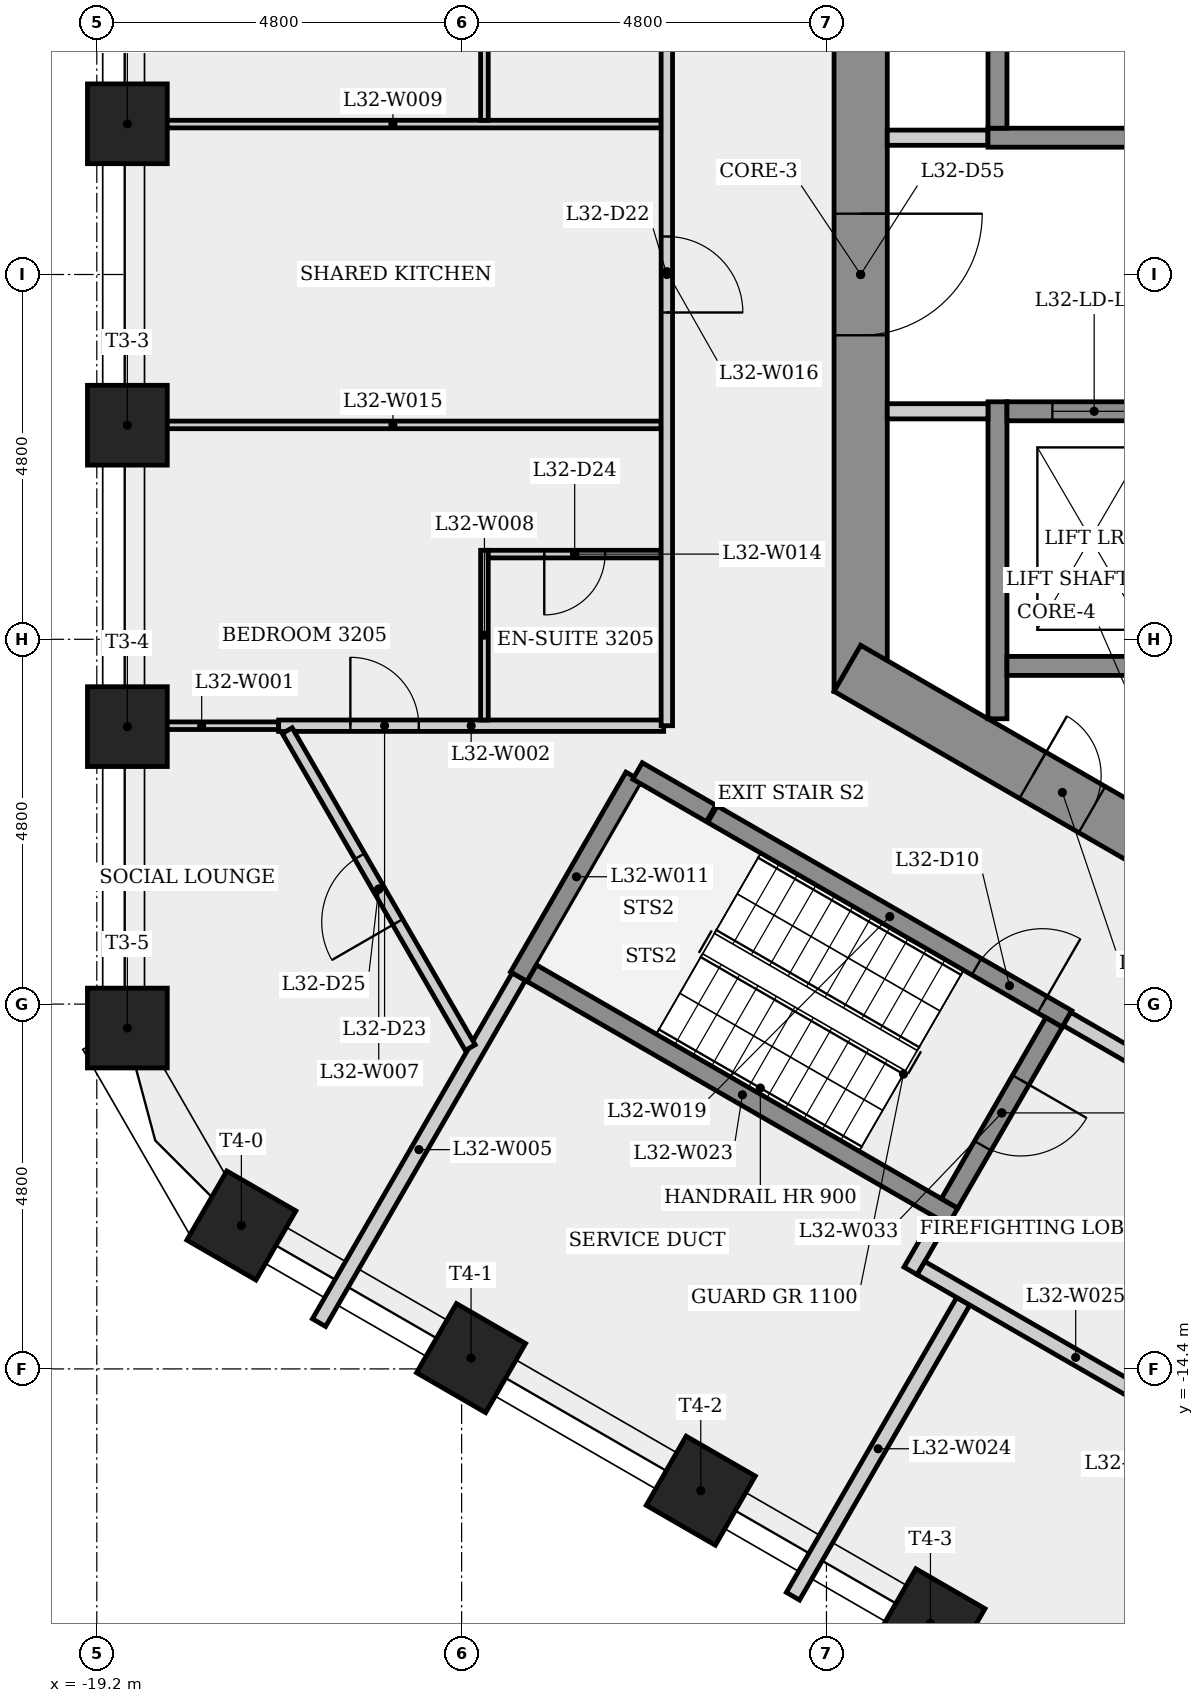
"""IFC4 building model, lengths in metres.
Left out: names, types, materials, properties, quantities, classifications, styles, units other than length and angle.
Written with IfcOpenShell. Run it as: python <this file> out.ifc"""

import sys

from ifc_helpers import new_model, si_unit, direction, frame, frame_2d, origin, origin_2d, place, context, subcontext, project, spatial, rectangle, extrude, element, fill, save


model = new_model("IFC4")
c1 = context("Model", 3, precision=1e-05, world=origin(), true_north=direction((0.0, 1.0)))
c2 = subcontext(c1, "Body", "Model", "MODEL_VIEW")
j1 = project(units=[si_unit("LENGTHUNIT", "METRE"), si_unit("PLANEANGLEUNIT", "RADIAN")], contexts=[c1])
p1 = place(None, origin())
s1 = spatial("IfcSite", under=j1, at=p1, CompositionType="ELEMENT")
p2 = place(p1, origin())
s2 = spatial("IfcBuilding", under=s1, at=p2, CompositionType="ELEMENT")
p3 = place(p2, frame((0.0, 0.0, 120.5)))
s3 = spatial("IfcBuildingStorey", under=s2, at=p3, CompositionType="ELEMENT", Elevation=120.5)
p4 = place(p3, frame((-9.15, 5.485, 0.0), z_axis=(0.0, 0.0, 1.0), x_axis=(0.0, -1.0, 0.0)))
e1 = element("IfcWall", 1, at=p4, inside=s3, PredefinedType="SHEAR", context=c2, shape_type="SweptSolid", body=[
    extrude(rectangle(XDim=10.97, YDim=0.7, at=frame_2d((5.485, 0.0))), origin(), (0.0, 0.0, 1.0), 4.0),
])
p5 = place(p4, frame((4.685, 0.0, 0.0)))
e2 = element("IfcOpeningElement", 2, at=p5, cuts=e1, PredefinedType="OPENING", context=c2, shape_type="SweptSolid", body=[
    extrude(rectangle(XDim=1.6, YDim=2.1, at=frame_2d((0.8, 1.05))), frame((0.0, 0.36, 0.0), z_axis=(0.0, -1.0, 0.0), x_axis=(1.0, 0.0, 0.0)), (0.0, 0.0, 1.0), 0.72),
])
p6 = place(p3, frame((-9.325, -5.182, 0.0), z_axis=(0.0, 0.0, 1.0), x_axis=(0.866023993627, -0.500002442456, 0.0)))
e3 = element("IfcWall", 3, at=p6, inside=s3, PredefinedType="SHEAR", context=c2, shape_type="SweptSolid", body=[
    extrude(rectangle(XDim=10.97, YDim=0.7, at=frame_2d((5.485, 0.0))), origin(), (0.0, 0.0, 1.0), 4.0),
])
p7 = place(p6, frame((2.817, 0.0, 0.0)))
e4 = element("IfcOpeningElement", 4, at=p7, cuts=e3, PredefinedType="OPENING", context=c2, shape_type="SweptSolid", body=[
    extrude(rectangle(XDim=0.9, YDim=2.1, at=frame_2d((0.45, 1.05))), frame((0.0, 0.36, 0.0), z_axis=(0.0, -1.0, 0.0), x_axis=(1.0, 0.0, 0.0)), (0.0, 0.0, 1.0), 0.72),
])
for number, where, z_axis, x_axis in (
    (5, (-18.798, 1.983, 0.0), (0.0, 0.0, 1.0), (-1.0, 0.0, 0.0)),
    (6, (-18.798, -1.983, 0.0), (0.0, 0.0, 1.0), (-1.0, 0.0, 0.0)),
    (7, (-18.798, -5.949, 0.0), (0.0, 0.0, 1.0), (-1.0, 0.0, 0.0)),
    (8, (-18.798, -9.915, 0.0), (0.0, 0.0, 1.0), (-1.0, 0.0, 0.0)),
    (9, (-17.298, -12.513, 0.0), (0.0, 0.0, 1.0), (-0.5, -0.866, 0.0)),
    (10, (-14.276, -14.258, 0.0), (0.0, 0.0, 1.0), (-0.5, -0.866, 0.0)),
    (11, (-11.254, -16.003, 0.0), (0.0, 0.0, 1.0), (-0.5, -0.866, 0.0)),
    (12, (-8.232, -17.747, 0.0), (0.0, 0.0, 1.0), (-0.5, -0.866, 0.0)),
):
    element("IfcColumn", number, at=place(p3, frame(where, z_axis=z_axis, x_axis=x_axis)), inside=s3, PredefinedType="COLUMN", context=c2, shape_type="SweptSolid", body=[
        extrude(rectangle(XDim=1.05, YDim=1.05, at=origin_2d()), origin(), (0.0, 0.0, 1.0), 4.0),
    ])
p8 = place(p3, frame((-16.807, -5.937, 0.0), z_axis=(0.0, 0.0, 1.0), x_axis=(-1.0, 0.0, 0.0)))
e13 = element("IfcWall", 13, at=p8, inside=s3, PredefinedType="PARTITIONING", context=c2, shape_type="SweptSolid", body=[
    extrude(rectangle(XDim=2.026, YDim=0.1, at=frame_2d((1.013, 0.0))), origin(), (0.0, 0.0, 1.0), 3.6),
])
p9 = place(p3, frame((-16.807, -5.937, 0.0), z_axis=(0.0, 0.0, 1.0), x_axis=(1.0, 0.0, 0.0)))
e14 = element("IfcWall", 14, at=p9, inside=s3, PredefinedType="PARTITIONING", context=c2, shape_type="SweptSolid", body=[
    extrude(rectangle(XDim=5.066, YDim=0.15, at=frame_2d((2.533, 0.0))), origin(), (0.0, 0.0, 1.0), 3.6),
])
p10 = place(p9, frame((0.943, 0.0, 0.0)))
e15 = element("IfcOpeningElement", 15, at=p10, cuts=e14, PredefinedType="OPENING", context=c2, shape_type="SweptSolid", body=[
    extrude(rectangle(XDim=0.9, YDim=2.1, at=frame_2d((0.45, 1.05))), frame((0.0, 0.085, 0.0), z_axis=(0.0, -1.0, 0.0), x_axis=(1.0, 0.0, 0.0)), (0.0, 0.0, 1.0), 0.17),
])
p11 = place(p3, frame((-16.276, -13.791, 0.0), z_axis=(0.0, 0.0, 1.0), x_axis=(0.499970375258, 0.866042506961, 0.0)))
e16 = element("IfcWall", 16, at=p11, inside=s3, PredefinedType="PLUMBINGWALL", context=c2, shape_type="SweptSolid", body=[
    extrude(rectangle(XDim=5.257, YDim=0.2, at=frame_2d((2.628, 0.0))), origin(), (0.0, 0.0, 1.0), 3.6),
])
p12 = place(p3, frame((-14.287, -10.172, 0.0), z_axis=(0.0, 0.0, 1.0), x_axis=(-0.499988695522, 0.866031930329, 0.0)))
e17 = element("IfcWall", 17, at=p12, inside=s3, PredefinedType="PARTITIONING", context=c2, shape_type="SweptSolid", body=[
    extrude(rectangle(XDim=4.815, YDim=0.15, at=frame_2d((2.408, 0.0))), origin(), (0.0, 0.0, 1.0), 3.6),
])
p13 = place(p12, frame((1.908, 0.0, 0.0)))
e18 = element("IfcOpeningElement", 18, at=p13, cuts=e17, PredefinedType="OPENING", context=c2, shape_type="SweptSolid", body=[
    extrude(rectangle(XDim=1.0, YDim=2.1, at=frame_2d((0.5, 1.05))), frame((0.0, 0.085, 0.0), z_axis=(0.0, -1.0, 0.0), x_axis=(1.0, 0.0, 0.0)), (0.0, 0.0, 1.0), 0.17),
])
p14 = place(p3, frame((-14.1, -3.629, 0.0), z_axis=(0.0, 0.0, 1.0), x_axis=(0.0, -1.0, 0.0)))
e19 = element("IfcWall", 19, at=p14, inside=s3, PredefinedType="PARTITIONING", context=c2, shape_type="SweptSolid", body=[
    extrude(rectangle(XDim=2.233, YDim=0.1, at=frame_2d((1.116, 0.0))), origin(), (0.0, 0.0, 1.0), 3.6),
])
p15 = place(p3, frame((-18.833, 1.979, 0.0), z_axis=(0.0, 0.0, 1.0), x_axis=(1.0, 0.0, 0.0)))
e20 = element("IfcWall", 20, at=p15, inside=s3, PredefinedType="PARTITIONING", context=c2, shape_type="SweptSolid", body=[
    extrude(rectangle(XDim=7.058, YDim=0.1, at=frame_2d((3.529, 0.0))), origin(), (0.0, 0.0, 1.0), 3.6),
])
p16 = place(p3, frame((-14.1, 4.287, 0.0), z_axis=(0.0, 0.0, 1.0), x_axis=(0.0, -1.0, 0.0)))
e21 = element("IfcWall", 21, at=p16, inside=s3, PredefinedType="PARTITIONING", context=c2, shape_type="SweptSolid", body=[
    extrude(rectangle(XDim=2.258, YDim=0.1, at=frame_2d((1.129, 0.0))), origin(), (0.0, 0.0, 1.0), 3.6),
])
p17 = place(p3, frame((-13.648, -9.239, 0.0), z_axis=(0.0, 0.0, 1.0), x_axis=(0.50000556753, 0.866022189346, 0.0)))
e22 = element("IfcWall", 22, at=p17, inside=s3, PredefinedType="SHEAR", context=c2, shape_type="SweptSolid", body=[
    extrude(rectangle(XDim=3.036, YDim=0.25, at=frame_2d((1.518, 0.0))), origin(), (0.0, 0.0, 1.0), 3.6),
])
p18 = place(p3, frame((-12.085, -6.532, 0.0), z_axis=(0.0, 0.0, 1.0), x_axis=(0.86604373436, -0.499968249168, 0.0)))
e23 = element("IfcWall", 23, at=p18, inside=s3, PredefinedType="SHEAR", context=c2, shape_type="SweptSolid", body=[
    extrude(rectangle(XDim=1.118, YDim=0.25, at=frame_2d((0.559, 0.0))), origin(), (0.0, 0.0, 1.0), 3.6),
])
p19 = place(p3, frame((-11.775, -3.679, 0.0), z_axis=(0.0, 0.0, 1.0), x_axis=(-1.0, 0.0, 0.0)))
e24 = element("IfcWall", 24, at=p19, inside=s3, PredefinedType="PARTITIONING", context=c2, shape_type="SweptSolid", body=[
    extrude(rectangle(XDim=2.275, YDim=0.1, at=frame_2d((1.138, 0.0))), origin(), (0.0, 0.0, 1.0), 3.6),
])
p20 = place(p19, frame((0.738, 0.0, 0.0)))
e25 = element("IfcOpeningElement", 25, at=p20, cuts=e24, PredefinedType="OPENING", context=c2, shape_type="SweptSolid", body=[
    extrude(rectangle(XDim=0.8, YDim=2.1, at=frame_2d((0.4, 1.05))), frame((0.0, 0.06, 0.0), z_axis=(0.0, -1.0, 0.0), x_axis=(1.0, 0.0, 0.0)), (0.0, 0.0, 1.0), 0.12),
])
p21 = place(p3, frame((-11.775, -1.979, 0.0), z_axis=(0.0, 0.0, 1.0), x_axis=(-1.0, 0.0, 0.0)))
e26 = element("IfcWall", 26, at=p21, inside=s3, PredefinedType="PARTITIONING", context=c2, shape_type="SweptSolid", body=[
    extrude(rectangle(XDim=7.058, YDim=0.1, at=frame_2d((3.529, 0.0))), origin(), (0.0, 0.0, 1.0), 3.6),
])
p22 = place(p3, frame((-11.7, 6.012, 0.0), z_axis=(0.0, 0.0, 1.0), x_axis=(0.0, -1.0, 0.0)))
e27 = element("IfcWall", 27, at=p22, inside=s3, PredefinedType="PARTITIONING", context=c2, shape_type="SweptSolid", body=[
    extrude(rectangle(XDim=11.949, YDim=0.15, at=frame_2d((5.975, 0.0))), origin(), (0.0, 0.0, 1.0), 3.6),
])
p23 = place(p22, frame((5.512, 0.0, 0.0)))
e28 = element("IfcOpeningElement", 28, at=p23, cuts=e27, PredefinedType="OPENING", context=c2, shape_type="SweptSolid", body=[
    extrude(rectangle(XDim=1.0, YDim=2.1, at=frame_2d((0.5, 1.05))), frame((0.0, 0.085, 0.0), z_axis=(0.0, -1.0, 0.0), x_axis=(1.0, 0.0, 0.0)), (0.0, 0.0, 1.0), 0.17),
])
p24 = place(p3, frame((-11.1, -7.101, 0.0), z_axis=(0.0, 0.0, 1.0), x_axis=(0.866028615007, -0.499994437958, 0.0)))
e29 = element("IfcWall", 29, at=p24, inside=s3, PredefinedType="SHEAR", context=c2, shape_type="SweptSolid", body=[
    extrude(rectangle(XDim=5.387, YDim=0.25, at=frame_2d((2.694, 0.0))), origin(), (0.0, 0.0, 1.0), 3.6),
])
p25 = place(p24, frame((4.012, 0.0, 0.0)))
e30 = element("IfcOpeningElement", 30, at=p25, cuts=e29, PredefinedType="OPENING", context=c2, shape_type="SweptSolid", body=[
    extrude(rectangle(XDim=1.0, YDim=2.1, at=frame_2d((0.5, 1.05))), frame((0.0, 0.135, 0.0), z_axis=(0.0, -1.0, 0.0), x_axis=(1.0, 0.0, 0.0)), (0.0, 0.0, 1.0), 0.27),
])
p26 = place(p3, frame((-8.8, 1.8, 0.0), z_axis=(0.0, 0.0, 1.0), x_axis=(1.0, 0.0, 0.0)))
e31 = element("IfcWall", 31, at=p26, inside=s3, PredefinedType="PARTITIONING", context=c2, shape_type="SweptSolid", body=[
    extrude(rectangle(XDim=1.325, YDim=0.2, at=frame_2d((0.663, 0.0))), origin(), (0.0, 0.0, 1.0), 3.6),
])
p27 = place(p3, frame((-8.493, -13.11, 0.0), z_axis=(0.0, 0.0, 1.0), x_axis=(0.500067724834, 0.865986299303, 0.0)))
e32 = element("IfcWall", 32, at=p27, inside=s3, PredefinedType="PLUMBINGWALL", context=c2, shape_type="SweptSolid", body=[
    extrude(rectangle(XDim=0.775, YDim=0.2, at=frame_2d((0.388, 0.0))), origin(), (0.0, 0.0, 1.0), 3.6),
])
p28 = place(p3, frame((-7.935, -12.393, 0.0), z_axis=(0.0, 0.0, 1.0), x_axis=(-0.866025499775, 0.499999833739, 0.0)))
e33 = element("IfcWall", 33, at=p28, inside=s3, PredefinedType="SHEAR", context=c2, shape_type="SweptSolid", body=[
    extrude(rectangle(XDim=6.4, YDim=0.25, at=frame_2d((3.2, 0.0))), origin(), (0.0, 0.0, 1.0), 3.6),
])
p29 = place(p3, frame((-7.8, -13.51, 0.0), z_axis=(0.0, 0.0, 1.0), x_axis=(-0.499994393058, -0.866028640929, 0.0)))
e34 = element("IfcWall", 34, at=p29, inside=s3, PredefinedType="PLUMBINGWALL", context=c2, shape_type="SweptSolid", body=[
    extrude(rectangle(XDim=4.481, YDim=0.2, at=frame_2d((2.241, 0.0))), origin(), (0.0, 0.0, 1.0), 3.6),
])
p30 = place(p3, frame((-8.356, -13.073, 0.0), z_axis=(0.0, 0.0, 1.0), x_axis=(0.866038532462, -0.499977259774, 0.0)))
e35 = element("IfcWall", 35, at=p30, inside=s3, PredefinedType="PLUMBINGWALL", context=c2, shape_type="SweptSolid", body=[
    extrude(rectangle(XDim=4.7, YDim=0.2, at=frame_2d((2.35, 0.0))), origin(), (0.0, 0.0, 1.0), 3.6),
])
p31 = place(p3, frame((-7.475, 1.8, 0.0), z_axis=(0.0, 0.0, 1.0), x_axis=(1.0, 0.0, 0.0)))
e36 = element("IfcWall", 36, at=p31, inside=s3, PredefinedType="SHEAR", context=c2, shape_type="SweptSolid", body=[
    extrude(rectangle(XDim=14.95, YDim=0.25, at=frame_2d((7.475, 0.0))), origin(), (0.0, 0.0, 1.0), 3.6),
])
p32 = place(p3, frame((-7.35, -5.846, 0.0), z_axis=(0.0, 0.0, 1.0), x_axis=(0.0, 1.0, 0.0)))
e37 = element("IfcWall", 37, at=p32, inside=s3, PredefinedType="SHEAR", context=c2, shape_type="SweptSolid", body=[
    extrude(rectangle(XDim=4.171, YDim=0.25, at=frame_2d((2.085, 0.0))), origin(), (0.0, 0.0, 1.0), 3.6),
])
p33 = place(p3, frame((-7.35, 1.925, 0.0), z_axis=(0.0, 0.0, 1.0), x_axis=(0.0, 1.0, 0.0)))
e38 = element("IfcWall", 38, at=p33, inside=s3, PredefinedType="SHEAR", context=c2, shape_type="SweptSolid", body=[
    extrude(rectangle(XDim=3.921, YDim=0.25, at=frame_2d((1.96, 0.0))), origin(), (0.0, 0.0, 1.0), 3.6),
])
p34 = place(p3, frame((-7.475, -1.8, 0.0), z_axis=(0.0, 0.0, 1.0), x_axis=(-1.0, 0.0, 0.0)))
e39 = element("IfcWall", 39, at=p34, inside=s3, PredefinedType="PARTITIONING", context=c2, shape_type="SweptSolid", body=[
    extrude(rectangle(XDim=1.325, YDim=0.2, at=frame_2d((0.663, 0.0))), origin(), (0.0, 0.0, 1.0), 3.6),
])
p35 = place(p3, frame((-6.605, -9.841, 0.0), z_axis=(0.0, 0.0, 1.0), x_axis=(-0.499996545922, -0.866027397988, 0.0)))
e40 = element("IfcWall", 40, at=p35, inside=s3, PredefinedType="SHEAR", context=c2, shape_type="SweptSolid", body=[
    extrude(rectangle(XDim=2.75, YDim=0.25, at=frame_2d((1.375, 0.0))), origin(), (0.0, 0.0, 1.0), 3.6),
])
p36 = place(p35, frame((0.875, 0.0, 0.0)))
e41 = element("IfcOpeningElement", 41, at=p36, cuts=e40, PredefinedType="OPENING", context=c2, shape_type="SweptSolid", body=[
    extrude(rectangle(XDim=1.0, YDim=2.1, at=frame_2d((0.5, 1.05))), frame((0.0, 0.135, 0.0), z_axis=(0.0, -1.0, 0.0), x_axis=(1.0, 0.0, 0.0)), (0.0, 0.0, 1.0), 0.27),
])
p37 = place(p3, frame((-6.435, -9.795, 0.0), z_axis=(0.0, 0.0, 1.0), x_axis=(0.866012907634, -0.500021643343, 0.0)))
e42 = element("IfcWall", 42, at=p37, inside=s3, PredefinedType="PARTITIONING", context=c2, shape_type="SweptSolid", body=[
    extrude(rectangle(XDim=4.45, YDim=0.2, at=frame_2d((2.225, 0.0))), origin(), (0.0, 0.0, 1.0), 3.6),
])
p38 = place(p37, frame((1.675, 0.0, 0.0)))
e43 = element("IfcOpeningElement", 43, at=p38, cuts=e42, PredefinedType="OPENING", context=c2, shape_type="SweptSolid", body=[
    extrude(rectangle(XDim=1.1, YDim=2.1, at=frame_2d((0.55, 1.05))), frame((0.0, 0.11, 0.0), z_axis=(0.0, -1.0, 0.0), x_axis=(1.0, 0.0, 0.0)), (0.0, 0.0, 1.0), 0.22),
])
p39 = place(p3, frame((-7.225, -5.15, 0.0), z_axis=(0.0, 0.0, 1.0), x_axis=(1.0, 0.0, 0.0)))
e44 = element("IfcWall", 44, at=p39, inside=s3, PredefinedType="SHEAR", context=c2, shape_type="SweptSolid", body=[
    extrude(rectangle(XDim=14.7, YDim=0.25, at=frame_2d((7.35, 0.0))), origin(), (0.0, 0.0, 1.0), 3.6),
])
p40 = place(p3, frame((-7.225, -1.8, 0.0), z_axis=(0.0, 0.0, 1.0), x_axis=(1.0, 0.0, 0.0)))
e45 = element("IfcWall", 45, at=p40, inside=s3, PredefinedType="SHEAR", context=c2, shape_type="SweptSolid", body=[
    extrude(rectangle(XDim=14.7, YDim=0.25, at=frame_2d((7.35, 0.0))), origin(), (0.0, 0.0, 1.0), 3.6),
])
p41 = place(p40, frame((0.597, 0.0, 0.0)))
e46 = element("IfcOpeningElement", 46, at=p41, cuts=e45, PredefinedType="OPENING", context=c2, shape_type="SweptSolid", body=[
    extrude(rectangle(XDim=1.1, YDim=2.1, at=frame_2d((0.55, 1.05))), frame((0.0, 0.135, 0.0), z_axis=(0.0, -1.0, 0.0), x_axis=(1.0, 0.0, 0.0)), (0.0, 0.0, 1.0), 0.27),
])
p42 = place(p40, frame((3.0, 0.0, 0.0)))
e47 = element("IfcOpeningElement", 47, at=p42, cuts=e45, PredefinedType="OPENING", context=c2, shape_type="SweptSolid", body=[
    extrude(rectangle(XDim=1.1, YDim=2.1, at=frame_2d((0.55, 1.05))), frame((0.0, 0.135, 0.0), z_axis=(0.0, -1.0, 0.0), x_axis=(1.0, 0.0, 0.0)), (0.0, 0.0, 1.0), 0.27),
])
p43 = place(p40, frame((5.45, 0.0, 0.0)))
e48 = element("IfcOpeningElement", 48, at=p43, cuts=e45, PredefinedType="OPENING", context=c2, shape_type="SweptSolid", body=[
    extrude(rectangle(XDim=1.1, YDim=2.1, at=frame_2d((0.55, 1.05))), frame((0.0, 0.135, 0.0), z_axis=(0.0, -1.0, 0.0), x_axis=(1.0, 0.0, 0.0)), (0.0, 0.0, 1.0), 0.27),
])
p44 = place(p40, frame((7.9, 0.0, 0.0)))
e49 = element("IfcOpeningElement", 49, at=p44, cuts=e45, PredefinedType="OPENING", context=c2, shape_type="SweptSolid", body=[
    extrude(rectangle(XDim=1.1, YDim=2.1, at=frame_2d((0.55, 1.05))), frame((0.0, 0.135, 0.0), z_axis=(0.0, -1.0, 0.0), x_axis=(1.0, 0.0, 0.0)), (0.0, 0.0, 1.0), 0.27),
])
p45 = place(p40, frame((10.35, 0.0, 0.0)))
e50 = element("IfcOpeningElement", 50, at=p45, cuts=e45, PredefinedType="OPENING", context=c2, shape_type="SweptSolid", body=[
    extrude(rectangle(XDim=1.1, YDim=2.1, at=frame_2d((0.55, 1.05))), frame((0.0, 0.135, 0.0), z_axis=(0.0, -1.0, 0.0), x_axis=(1.0, 0.0, 0.0)), (0.0, 0.0, 1.0), 0.27),
])
p46 = place(p41, origin())
e51 = element("IfcDoor", 51, at=p46, inside=s3, OperationType="SLIDING_TO_LEFT", PredefinedType="DOOR", context=c2, shape_type="SweptSolid", body=[
    extrude(rectangle(XDim=1.1, YDim=2.1, at=frame_2d((0.55, 1.05))), frame((0.0, 0.025, 0.0), z_axis=(0.0, -1.0, 0.0), x_axis=(1.0, 0.0, 0.0)), (0.0, 0.0, 1.0), 0.05),
])
fill(e46, e51)
p47 = place(p25, origin())
e52 = element("IfcDoor", 52, at=p47, inside=s3, OperationType="SINGLE_SWING_RIGHT", PredefinedType="DOOR", context=c2, shape_type="SweptSolid", body=[
    extrude(rectangle(XDim=1.0, YDim=2.1, at=frame_2d((0.5, 1.05))), frame((0.0, 0.025, 0.0), z_axis=(0.0, -1.0, 0.0), x_axis=(1.0, 0.0, 0.0)), (0.0, 0.0, 1.0), 0.05),
])
fill(e30, e52)
p48 = place(p36, origin())
e53 = element("IfcDoor", 53, at=p48, inside=s3, OperationType="SINGLE_SWING_LEFT", PredefinedType="DOOR", context=c2, shape_type="SweptSolid", body=[
    extrude(rectangle(XDim=1.0, YDim=2.1, at=frame_2d((0.5, 1.05))), frame((0.0, 0.025, 0.0), z_axis=(0.0, -1.0, 0.0), x_axis=(1.0, 0.0, 0.0)), (0.0, 0.0, 1.0), 0.05),
])
fill(e41, e53)
p49 = place(p23, origin())
e54 = element("IfcDoor", 54, at=p49, inside=s3, OperationType="SINGLE_SWING_RIGHT", PredefinedType="DOOR", context=c2, shape_type="SweptSolid", body=[
    extrude(rectangle(XDim=1.0, YDim=2.1, at=frame_2d((0.5, 1.05))), frame((0.0, 0.025, 0.0), z_axis=(0.0, -1.0, 0.0), x_axis=(1.0, 0.0, 0.0)), (0.0, 0.0, 1.0), 0.05),
])
fill(e28, e54)
p50 = place(p10, origin())
e55 = element("IfcDoor", 55, at=p50, inside=s3, OperationType="SINGLE_SWING_LEFT", PredefinedType="DOOR", context=c2, shape_type="SweptSolid", body=[
    extrude(rectangle(XDim=0.9, YDim=2.1, at=frame_2d((0.45, 1.05))), frame((0.0, 0.025, 0.0), z_axis=(0.0, -1.0, 0.0), x_axis=(1.0, 0.0, 0.0)), (0.0, 0.0, 1.0), 0.05),
])
fill(e15, e55)
p51 = place(p20, origin())
e56 = element("IfcDoor", 56, at=p51, inside=s3, OperationType="SINGLE_SWING_RIGHT", PredefinedType="DOOR", context=c2, shape_type="SweptSolid", body=[
    extrude(rectangle(XDim=0.8, YDim=2.1, at=frame_2d((0.4, 1.05))), frame((0.0, 0.025, 0.0), z_axis=(0.0, -1.0, 0.0), x_axis=(1.0, 0.0, 0.0)), (0.0, 0.0, 1.0), 0.05),
])
fill(e25, e56)
p52 = place(p13, origin())
e57 = element("IfcDoor", 57, at=p52, inside=s3, OperationType="SINGLE_SWING_LEFT", PredefinedType="DOOR", context=c2, shape_type="SweptSolid", body=[
    extrude(rectangle(XDim=1.0, YDim=2.1, at=frame_2d((0.5, 1.05))), frame((0.0, 0.025, 0.0), z_axis=(0.0, -1.0, 0.0), x_axis=(1.0, 0.0, 0.0)), (0.0, 0.0, 1.0), 0.05),
])
fill(e18, e57)
p53 = place(p7, origin())
e58 = element("IfcDoor", 58, at=p53, inside=s3, OperationType="SINGLE_SWING_LEFT", PredefinedType="DOOR", context=c2, shape_type="SweptSolid", body=[
    extrude(rectangle(XDim=0.9, YDim=2.1, at=frame_2d((0.45, 1.05))), frame((0.0, 0.025, 0.0), z_axis=(0.0, -1.0, 0.0), x_axis=(1.0, 0.0, 0.0)), (0.0, 0.0, 1.0), 0.05),
])
fill(e4, e58)
p54 = place(p5, origin())
e59 = element("IfcDoor", 59, at=p54, inside=s3, OperationType="SINGLE_SWING_LEFT", PredefinedType="DOOR", context=c2, shape_type="SweptSolid", body=[
    extrude(rectangle(XDim=1.6, YDim=2.1, at=frame_2d((0.8, 1.05))), frame((0.0, 0.025, 0.0), z_axis=(0.0, -1.0, 0.0), x_axis=(1.0, 0.0, 0.0)), (0.0, 0.0, 1.0), 0.05),
])
fill(e2, e59)
save(model, sys.argv[1])
